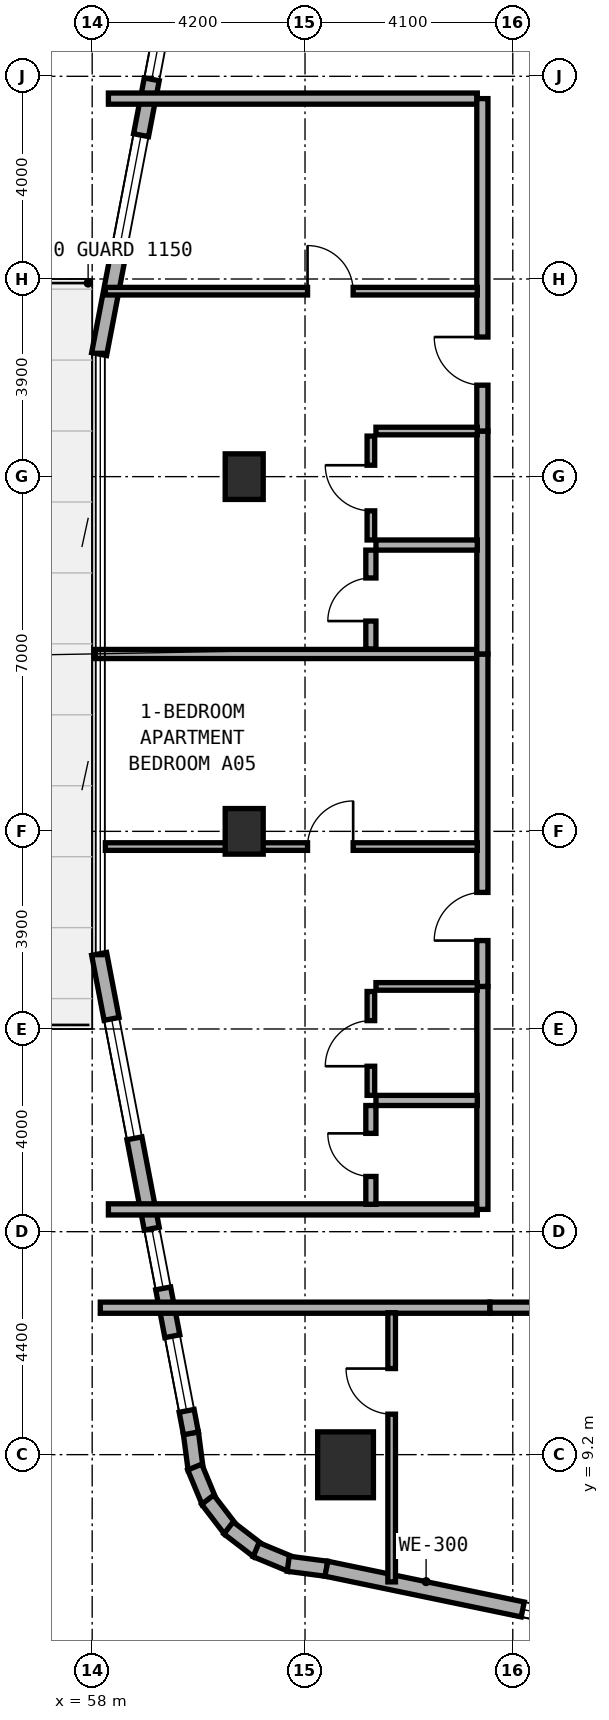
"""IFC4 building model, lengths in metres.
Left out: names, types, materials, properties, quantities, classifications, styles, units other than length and angle.
Written with IfcOpenShell. Run it as: python <this file> out.ifc"""

import sys

from ifc_helpers import new_model, si_unit, direction, frame, frame_2d, origin, origin_2d, place, context, subcontext, project, spatial, rectangle, extrude, element, fill, save


model = new_model("IFC4")
c1 = context("Model", 3, precision=1e-05, world=origin(), true_north=direction((0.0, 1.0)))
c2 = subcontext(c1, "Body", "Model", "MODEL_VIEW")
j1 = project(units=[si_unit("LENGTHUNIT", "METRE"), si_unit("PLANEANGLEUNIT", "RADIAN")], contexts=[c1])
p1 = place(None, origin())
s1 = spatial("IfcSite", under=j1, at=p1, CompositionType="ELEMENT")
p2 = place(p1, origin())
s2 = spatial("IfcBuilding", under=s1, at=p2, CompositionType="ELEMENT")
p3 = place(p2, frame((0.0, 0.0, 24.0)))
s3 = spatial("IfcBuildingStorey", under=s2, at=p3, CompositionType="ELEMENT", Elevation=24.0)
for number, where, z_axis, x_axis in (
    (1, (61.0, 21.5, 0.0), (0.0, 0.0, 1.0), (1.0, 0.0, 0.0)),
    (2, (61.0, 28.5, 0.0), (0.0, 0.0, 1.0), (1.0, 0.0, 0.0)),
):
    element("IfcColumn", number, at=place(p3, frame(where, z_axis=z_axis, x_axis=x_axis)), inside=s3, PredefinedType="COLUMN", context=c2, shape_type="SweptSolid", body=[
        extrude(rectangle(XDim=0.75, YDim=0.9, at=origin_2d()), origin(), (0.0, 0.0, 1.0), 3.5),
    ])
p4 = place(p3, frame((63.0, 9.0, 0.0), z_axis=(0.0, 0.0, 1.0), x_axis=(1.0, 0.0, 0.0)))
e3 = element("IfcColumn", 3, at=p4, inside=s3, PredefinedType="COLUMN", context=c2, shape_type="SweptSolid", body=[
    extrude(rectangle(XDim=1.1, YDim=1.3, at=origin_2d()), origin(), (0.0, 0.0, 1.0), 3.5),
])
p5 = place(p3, frame((59.948, 9.627, 0.0), z_axis=(0.0, 0.0, 1.0), x_axis=(0.130255288807, -0.991480488834, 0.0)))
e4 = element("IfcWall", 4, at=p5, inside=s3, PredefinedType="STANDARD", context=c2, shape_type="SweptSolid", body=[
    extrude(rectangle(XDim=0.729, YDim=0.3, at=frame_2d((0.365, 0.0))), origin(), (0.0, 0.0, 1.0), 3.25),
])
for number, where, z_axis, x_axis in (
    (5, (60.024, 8.955, 0.0), (0.0, 0.0, 1.0), (0.384, -0.924, 0.0)),
    (6, (60.279, 8.311, 0.0), (0.0, 0.0, 1.0), (0.608, -0.794, 0.0)),
    (7, (60.691, 7.754, 0.0), (0.0, 0.0, 1.0), (0.794, -0.608, 0.0)),
    (8, (61.234, 7.324, 0.0), (0.0, 0.0, 1.0), (0.924, -0.383, 0.0)),
):
    element("IfcWall", number, at=place(p3, frame(where, z_axis=z_axis, x_axis=x_axis)), inside=s3, PredefinedType="STANDARD", context=c2, shape_type="SweptSolid", body=[
        extrude(rectangle(XDim=0.746, YDim=0.3, at=frame_2d((0.373, 0.0))), origin(), (0.0, 0.0, 1.0), 3.25),
    ])
p6 = place(p3, frame((61.869, 7.047, 0.0), z_axis=(0.0, 0.0, 1.0), x_axis=(0.991559404866, -0.129653178221, 0.0)))
e9 = element("IfcWall", 9, at=p6, inside=s3, PredefinedType="STANDARD", context=c2, shape_type="SweptSolid", body=[
    extrude(rectangle(XDim=0.764, YDim=0.3, at=frame_2d((0.382, 0.0))), origin(), (0.0, 0.0, 1.0), 3.25),
])
p7 = place(p3, frame((62.622, 6.949, 0.0), z_axis=(0.0, 0.0, 1.0), x_axis=(0.979127260729, -0.203248142175, 0.0)))
e10 = element("IfcWall", 10, at=p7, inside=s3, PredefinedType="STANDARD", context=c2, shape_type="SweptSolid", body=[
    extrude(rectangle(XDim=8.92, YDim=0.3, at=frame_2d((4.46, 0.0))), origin(), (0.0, 0.0, 1.0), 3.25),
])
p8 = place(p7, frame((3.957, 0.0, 0.8)))
e11 = element("IfcOpeningElement", 11, at=p8, cuts=e10, PredefinedType="OPENING", context=c2, shape_type="SweptSolid", body=[
    extrude(rectangle(XDim=2.4, YDim=1.6, at=frame_2d((1.2, 0.8))), frame((0.0, 0.16, 0.0), z_axis=(0.0, -1.0, 0.0), x_axis=(1.0, 0.0, 0.0)), (0.0, 0.0, 1.0), 0.32),
])
p9 = place(p3, frame((59.949, 40.38, 0.0), z_axis=(0.0, 0.0, 1.0), x_axis=(-0.188087874316, -0.982152203854, 0.0)))
e12 = element("IfcWall", 12, at=p9, inside=s3, PredefinedType="STANDARD", context=c2, shape_type="SweptSolid", body=[
    extrude(rectangle(XDim=9.634, YDim=0.3, at=frame_2d((4.817, 0.0))), origin(), (0.0, 0.0, 1.0), 3.25),
])
p10 = place(p9, frame((0.452, 0.0, 0.85)))
e13 = element("IfcOpeningElement", 13, at=p10, cuts=e12, PredefinedType="OPENING", context=c2, shape_type="SweptSolid", body=[
    extrude(rectangle(XDim=1.5, YDim=1.5, at=frame_2d((0.75, 0.75))), frame((0.0, 0.16, 0.0), z_axis=(0.0, -1.0, 0.0), x_axis=(1.0, 0.0, 0.0)), (0.0, 0.0, 1.0), 0.32),
])
p11 = place(p9, frame((2.913, 0.0, 0.85)))
e14 = element("IfcOpeningElement", 14, at=p11, cuts=e12, PredefinedType="OPENING", context=c2, shape_type="SweptSolid", body=[
    extrude(rectangle(XDim=1.2, YDim=1.5, at=frame_2d((0.6, 0.75))), frame((0.0, 0.16, 0.0), z_axis=(0.0, -1.0, 0.0), x_axis=(1.0, 0.0, 0.0)), (0.0, 0.0, 1.0), 0.32),
])
p12 = place(p9, frame((5.235, 0.0, 0.8)))
e15 = element("IfcOpeningElement", 15, at=p12, cuts=e12, PredefinedType="OPENING", context=c2, shape_type="SweptSolid", body=[
    extrude(rectangle(XDim=2.4, YDim=1.6, at=frame_2d((1.2, 0.8))), frame((0.0, 0.16, 0.0), z_axis=(0.0, -1.0, 0.0), x_axis=(1.0, 0.0, 0.0)), (0.0, 0.0, 1.0), 0.32),
])
p13 = place(p3, frame((58.137, 19.082, 0.0), z_axis=(0.0, 0.0, 1.0), x_axis=(0.188087874316, -0.982152203854, 0.0)))
e16 = element("IfcWall", 16, at=p13, inside=s3, PredefinedType="STANDARD", context=c2, shape_type="SweptSolid", body=[
    extrude(rectangle(XDim=9.634, YDim=0.3, at=frame_2d((4.817, 0.0))), origin(), (0.0, 0.0, 1.0), 3.25),
])
p14 = place(p13, frame((1.306, 0.0, 0.8)))
e17 = element("IfcOpeningElement", 17, at=p14, cuts=e16, PredefinedType="OPENING", context=c2, shape_type="SweptSolid", body=[
    extrude(rectangle(XDim=2.4, YDim=1.6, at=frame_2d((1.2, 0.8))), frame((0.0, 0.16, 0.0), z_axis=(0.0, -1.0, 0.0), x_axis=(1.0, 0.0, 0.0)), (0.0, 0.0, 1.0), 0.32),
])
p15 = place(p13, frame((5.521, 0.0, 0.85)))
e18 = element("IfcOpeningElement", 18, at=p15, cuts=e16, PredefinedType="OPENING", context=c2, shape_type="SweptSolid", body=[
    extrude(rectangle(XDim=1.2, YDim=1.5, at=frame_2d((0.6, 0.75))), frame((0.0, 0.16, 0.0), z_axis=(0.0, -1.0, 0.0), x_axis=(1.0, 0.0, 0.0)), (0.0, 0.0, 1.0), 0.32),
])
p16 = place(p13, frame((7.682, 0.0, 0.85)))
e19 = element("IfcOpeningElement", 19, at=p16, cuts=e16, PredefinedType="OPENING", context=c2, shape_type="SweptSolid", body=[
    extrude(rectangle(XDim=1.5, YDim=1.5, at=frame_2d((0.75, 0.75))), frame((0.0, 0.16, 0.0), z_axis=(0.0, -1.0, 0.0), x_axis=(1.0, 0.0, 0.0)), (0.0, 0.0, 1.0), 0.32),
])
p17 = place(p3, frame((58.16, 12.1, 0.0), z_axis=(0.0, 0.0, 1.0), x_axis=(1.0, 0.0, 0.0)))
e20 = element("IfcWall", 20, at=p17, inside=s3, PredefinedType="SOLIDWALL", context=c2, shape_type="SweptSolid", body=[
    extrude(rectangle(XDim=7.69, YDim=0.22, at=frame_2d((3.845, 0.0))), origin(), (0.0, 0.0, 1.0), 2.865),
])
p18 = place(p3, frame((65.85, 12.1, 0.0), z_axis=(0.0, 0.0, 1.0), x_axis=(1.0, 0.0, 0.0)))
e21 = element("IfcWall", 21, at=p18, inside=s3, PredefinedType="SOLIDWALL", context=c2, shape_type="SweptSolid", body=[
    extrude(rectangle(XDim=8.87, YDim=0.22, at=frame_2d((4.435, 0.0))), origin(), (0.0, 0.0, 1.0), 2.725),
])
p19 = place(p18, frame((3.96, 0.0, 0.0)))
e22 = element("IfcOpeningElement", 22, at=p19, cuts=e21, PredefinedType="OPENING", context=c2, shape_type="SweptSolid", body=[
    extrude(rectangle(XDim=0.95, YDim=2.1, at=frame_2d((0.475, 1.05))), frame((0.0, 0.12, 0.0), z_axis=(0.0, -1.0, 0.0), x_axis=(1.0, 0.0, 0.0)), (0.0, 0.0, 1.0), 0.24),
])
p20 = place(p3, frame((63.91, 6.689, 0.0), z_axis=(0.0, 0.0, 1.0), x_axis=(0.0, 1.0, 0.0)))
e23 = element("IfcWall", 23, at=p20, inside=s3, PredefinedType="PARTITIONING", context=c2, shape_type="SweptSolid", body=[
    extrude(rectangle(XDim=5.311, YDim=0.15, at=frame_2d((2.656, 0.0))), origin(), (0.0, 0.0, 1.0), 2.865),
])
p21 = place(p20, frame((3.31, 0.0, 0.0)))
e24 = element("IfcOpeningElement", 24, at=p21, cuts=e23, PredefinedType="OPENING", context=c2, shape_type="SweptSolid", body=[
    extrude(rectangle(XDim=0.9, YDim=2.1, at=frame_2d((0.45, 1.05))), frame((0.0, 0.085, 0.0), z_axis=(0.0, -1.0, 0.0), x_axis=(1.0, 0.0, 0.0)), (0.0, 0.0, 1.0), 0.17),
])
for number, where, z_axis, x_axis in (
    (25, (58.32, 14.04, 0.0), (0.0, 0.0, 1.0), (1.0, 0.0, 0.0)),
    (26, (58.32, 35.96, 0.0), (0.0, 0.0, 1.0), (1.0, 0.0, 0.0)),
):
    element("IfcWall", number, at=place(p3, frame(where, z_axis=z_axis, x_axis=x_axis)), inside=s3, PredefinedType="SOLIDWALL", context=c2, shape_type="SweptSolid", body=[
        extrude(rectangle(XDim=7.28, YDim=0.22, at=frame_2d((3.64, 0.0))), origin(), (0.0, 0.0, 1.0), 2.865),
    ])
p22 = place(p3, frame((58.06, 25.0, 0.0), z_axis=(0.0, 0.0, 1.0), x_axis=(1.0, 0.0, 0.0)))
e27 = element("IfcWall", 27, at=p22, inside=s3, PredefinedType="SOLIDWALL", context=c2, shape_type="SweptSolid", body=[
    extrude(rectangle(XDim=7.64, YDim=0.18, at=frame_2d((3.82, 0.0))), origin(), (0.0, 0.0, 1.0), 2.865),
])
p23 = place(p3, frame((65.7, 14.04, 0.0), z_axis=(0.0, 0.0, 1.0), x_axis=(0.0, 1.0, 0.0)))
e28 = element("IfcWall", 28, at=p23, inside=s3, PredefinedType="SOLIDWALL", context=c2, shape_type="SweptSolid", body=[
    extrude(rectangle(XDim=4.4, YDim=0.22, at=frame_2d((2.2, 0.0))), origin(), (0.0, 0.0, 1.0), 3.22),
])
p24 = place(p3, frame((65.7, 18.44, 0.0), z_axis=(0.0, 0.0, 1.0), x_axis=(0.0, 1.0, 0.0)))
e29 = element("IfcWall", 29, at=p24, inside=s3, PredefinedType="SOLIDWALL", context=c2, shape_type="SweptSolid", body=[
    extrude(rectangle(XDim=6.56, YDim=0.22, at=frame_2d((3.28, 0.0))), origin(), (0.0, 0.0, 1.0), 2.725),
])
p25 = place(p24, frame((0.905, 0.0, 0.0)))
e30 = element("IfcOpeningElement", 30, at=p25, cuts=e29, PredefinedType="OPENING", context=c2, shape_type="SweptSolid", body=[
    extrude(rectangle(XDim=0.95, YDim=2.1, at=frame_2d((0.475, 1.05))), frame((0.0, 0.12, 0.0), z_axis=(0.0, -1.0, 0.0), x_axis=(1.0, 0.0, 0.0)), (0.0, 0.0, 1.0), 0.24),
])
p26 = place(p3, frame((58.26, 21.2, 0.0), z_axis=(0.0, 0.0, 1.0), x_axis=(1.0, 0.0, 0.0)))
e31 = element("IfcWall", 31, at=p26, inside=s3, PredefinedType="PARTITIONING", context=c2, shape_type="SweptSolid", body=[
    extrude(rectangle(XDim=7.34, YDim=0.15, at=frame_2d((3.67, 0.0))), origin(), (0.0, 0.0, 1.0), 2.865),
])
p27 = place(p26, frame((3.99, 0.0, 0.0)))
e32 = element("IfcOpeningElement", 32, at=p27, cuts=e31, PredefinedType="OPENING", context=c2, shape_type="SweptSolid", body=[
    extrude(rectangle(XDim=0.9, YDim=2.1, at=frame_2d((0.45, 1.05))), frame((0.0, 0.085, 0.0), z_axis=(0.0, -1.0, 0.0), x_axis=(1.0, 0.0, 0.0)), (0.0, 0.0, 1.0), 0.17),
])
p28 = place(p3, frame((63.6, 16.19, 0.0), z_axis=(0.0, 0.0, 1.0), x_axis=(1.0, 0.0, 0.0)))
e33 = element("IfcWall", 33, at=p28, inside=s3, PredefinedType="PLUMBINGWALL", context=c2, shape_type="SweptSolid", body=[
    extrude(rectangle(XDim=2.0, YDim=0.2, at=frame_2d((1.0, 0.0))), origin(), (0.0, 0.0, 1.0), 3.22),
])
p29 = place(p3, frame((63.6, 18.44, 0.0), z_axis=(0.0, 0.0, 1.0), x_axis=(1.0, 0.0, 0.0)))
e34 = element("IfcWall", 34, at=p29, inside=s3, PredefinedType="PARTITIONING", context=c2, shape_type="SweptSolid", body=[
    extrude(rectangle(XDim=2.0, YDim=0.15, at=frame_2d((1.0, 0.0))), origin(), (0.0, 0.0, 1.0), 3.22),
])
p30 = place(p3, frame((63.5, 14.14, 0.0), z_axis=(0.0, 0.0, 1.0), x_axis=(0.0, 1.0, 0.0)))
e35 = element("IfcWall", 35, at=p30, inside=s3, PredefinedType="PLUMBINGWALL", context=c2, shape_type="SweptSolid", body=[
    extrude(rectangle(XDim=1.95, YDim=0.2, at=frame_2d((0.975, 0.0))), origin(), (0.0, 0.0, 1.0), 3.22),
])
p31 = place(p30, frame((0.55, 0.0, 0.0)))
e36 = element("IfcOpeningElement", 36, at=p31, cuts=e35, PredefinedType="OPENING", context=c2, shape_type="SweptSolid", body=[
    extrude(rectangle(XDim=0.85, YDim=2.1, at=frame_2d((0.425, 1.05))), frame((0.0, 0.11, 0.0), z_axis=(0.0, -1.0, 0.0), x_axis=(1.0, 0.0, 0.0)), (0.0, 0.0, 1.0), 0.22),
])
p32 = place(p3, frame((63.5, 16.29, 0.0), z_axis=(0.0, 0.0, 1.0), x_axis=(0.0, 1.0, 0.0)))
e37 = element("IfcWall", 37, at=p32, inside=s3, PredefinedType="PARTITIONING", context=c2, shape_type="SweptSolid", body=[
    extrude(rectangle(XDim=2.05, YDim=0.15, at=frame_2d((1.025, 0.0))), origin(), (0.0, 0.0, 1.0), 3.22),
])
p33 = place(p32, frame((0.575, 0.0, 0.0)))
e38 = element("IfcOpeningElement", 38, at=p33, cuts=e37, PredefinedType="OPENING", context=c2, shape_type="SweptSolid", body=[
    extrude(rectangle(XDim=0.9, YDim=2.1, at=frame_2d((0.45, 1.05))), frame((0.0, 0.085, 0.0), z_axis=(0.0, -1.0, 0.0), x_axis=(1.0, 0.0, 0.0)), (0.0, 0.0, 1.0), 0.17),
])
p34 = place(p3, frame((65.7, 25.0, 0.0), z_axis=(0.0, 0.0, 1.0), x_axis=(0.0, 1.0, 0.0)))
e39 = element("IfcWall", 39, at=p34, inside=s3, PredefinedType="SOLIDWALL", context=c2, shape_type="SweptSolid", body=[
    extrude(rectangle(XDim=4.4, YDim=0.22, at=frame_2d((2.2, 0.0))), origin(), (0.0, 0.0, 1.0), 2.725),
])
p35 = place(p3, frame((65.7, 29.4, 0.0), z_axis=(0.0, 0.0, 1.0), x_axis=(0.0, 1.0, 0.0)))
e40 = element("IfcWall", 40, at=p35, inside=s3, PredefinedType="SOLIDWALL", context=c2, shape_type="SweptSolid", body=[
    extrude(rectangle(XDim=6.56, YDim=0.22, at=frame_2d((3.28, 0.0))), origin(), (0.0, 0.0, 1.0), 3.22),
])
p36 = place(p35, frame((0.905, 0.0, 0.0)))
e41 = element("IfcOpeningElement", 41, at=p36, cuts=e40, PredefinedType="OPENING", context=c2, shape_type="SweptSolid", body=[
    extrude(rectangle(XDim=0.95, YDim=2.1, at=frame_2d((0.475, 1.05))), frame((0.0, 0.12, 0.0), z_axis=(0.0, -1.0, 0.0), x_axis=(1.0, 0.0, 0.0)), (0.0, 0.0, 1.0), 0.24),
])
p37 = place(p3, frame((58.26, 32.16, 0.0), z_axis=(0.0, 0.0, 1.0), x_axis=(1.0, 0.0, 0.0)))
e42 = element("IfcWall", 42, at=p37, inside=s3, PredefinedType="PARTITIONING", context=c2, shape_type="SweptSolid", body=[
    extrude(rectangle(XDim=7.34, YDim=0.15, at=frame_2d((3.67, 0.0))), origin(), (0.0, 0.0, 1.0), 2.865),
])
p38 = place(p37, frame((3.99, 0.0, 0.0)))
e43 = element("IfcOpeningElement", 43, at=p38, cuts=e42, PredefinedType="OPENING", context=c2, shape_type="SweptSolid", body=[
    extrude(rectangle(XDim=0.9, YDim=2.1, at=frame_2d((0.45, 1.05))), frame((0.0, 0.085, 0.0), z_axis=(0.0, -1.0, 0.0), x_axis=(1.0, 0.0, 0.0)), (0.0, 0.0, 1.0), 0.17),
])
p39 = place(p3, frame((63.6, 27.15, 0.0), z_axis=(0.0, 0.0, 1.0), x_axis=(1.0, 0.0, 0.0)))
e44 = element("IfcWall", 44, at=p39, inside=s3, PredefinedType="PLUMBINGWALL", context=c2, shape_type="SweptSolid", body=[
    extrude(rectangle(XDim=2.0, YDim=0.2, at=frame_2d((1.0, 0.0))), origin(), (0.0, 0.0, 1.0), 3.22),
])
p40 = place(p3, frame((63.6, 29.4, 0.0), z_axis=(0.0, 0.0, 1.0), x_axis=(1.0, 0.0, 0.0)))
e45 = element("IfcWall", 45, at=p40, inside=s3, PredefinedType="PARTITIONING", context=c2, shape_type="SweptSolid", body=[
    extrude(rectangle(XDim=2.0, YDim=0.15, at=frame_2d((1.0, 0.0))), origin(), (0.0, 0.0, 1.0), 3.22),
])
p41 = place(p3, frame((63.5, 25.1, 0.0), z_axis=(0.0, 0.0, 1.0), x_axis=(0.0, 1.0, 0.0)))
e46 = element("IfcWall", 46, at=p41, inside=s3, PredefinedType="PLUMBINGWALL", context=c2, shape_type="SweptSolid", body=[
    extrude(rectangle(XDim=1.95, YDim=0.2, at=frame_2d((0.975, 0.0))), origin(), (0.0, 0.0, 1.0), 3.22),
])
p42 = place(p41, frame((0.55, 0.0, 0.0)))
e47 = element("IfcOpeningElement", 47, at=p42, cuts=e46, PredefinedType="OPENING", context=c2, shape_type="SweptSolid", body=[
    extrude(rectangle(XDim=0.85, YDim=2.1, at=frame_2d((0.425, 1.05))), frame((0.0, 0.11, 0.0), z_axis=(0.0, -1.0, 0.0), x_axis=(1.0, 0.0, 0.0)), (0.0, 0.0, 1.0), 0.22),
])
p43 = place(p3, frame((63.5, 27.25, 0.0), z_axis=(0.0, 0.0, 1.0), x_axis=(0.0, 1.0, 0.0)))
e48 = element("IfcWall", 48, at=p43, inside=s3, PredefinedType="PARTITIONING", context=c2, shape_type="SweptSolid", body=[
    extrude(rectangle(XDim=2.05, YDim=0.15, at=frame_2d((1.025, 0.0))), origin(), (0.0, 0.0, 1.0), 2.725),
])
p44 = place(p43, frame((0.575, 0.0, 0.0)))
e49 = element("IfcOpeningElement", 49, at=p44, cuts=e48, PredefinedType="OPENING", context=c2, shape_type="SweptSolid", body=[
    extrude(rectangle(XDim=0.9, YDim=2.1, at=frame_2d((0.45, 1.05))), frame((0.0, 0.085, 0.0), z_axis=(0.0, -1.0, 0.0), x_axis=(1.0, 0.0, 0.0)), (0.0, 0.0, 1.0), 0.17),
])
p45 = place(p8, origin())
e50 = element("IfcWindow", 50, at=p45, inside=s3, PartitioningType="SINGLE_PANEL", PredefinedType="WINDOW", context=c2, shape_type="SweptSolid", body=[
    extrude(rectangle(XDim=2.4, YDim=1.6, at=frame_2d((1.2, 0.8))), frame((0.0, 0.03, 0.0), z_axis=(0.0, -1.0, 0.0), x_axis=(1.0, 0.0, 0.0)), (0.0, 0.0, 1.0), 0.06),
])
fill(e11, e50)
p46 = place(p11, origin())
e51 = element("IfcWindow", 51, at=p46, inside=s3, PartitioningType="SINGLE_PANEL", PredefinedType="WINDOW", context=c2, shape_type="SweptSolid", body=[
    extrude(rectangle(XDim=1.2, YDim=1.5, at=frame_2d((0.6, 0.75))), frame((0.0, 0.03, 0.0), z_axis=(0.0, -1.0, 0.0), x_axis=(1.0, 0.0, 0.0)), (0.0, 0.0, 1.0), 0.06),
])
fill(e14, e51)
p47 = place(p12, origin())
e52 = element("IfcWindow", 52, at=p47, inside=s3, PartitioningType="SINGLE_PANEL", PredefinedType="WINDOW", context=c2, shape_type="SweptSolid", body=[
    extrude(rectangle(XDim=2.4, YDim=1.6, at=frame_2d((1.2, 0.8))), frame((0.0, 0.03, 0.0), z_axis=(0.0, -1.0, 0.0), x_axis=(1.0, 0.0, 0.0)), (0.0, 0.0, 1.0), 0.06),
])
fill(e15, e52)
p48 = place(p14, origin())
e53 = element("IfcWindow", 53, at=p48, inside=s3, PartitioningType="SINGLE_PANEL", PredefinedType="WINDOW", context=c2, shape_type="SweptSolid", body=[
    extrude(rectangle(XDim=2.4, YDim=1.6, at=frame_2d((1.2, 0.8))), frame((0.0, 0.03, 0.0), z_axis=(0.0, -1.0, 0.0), x_axis=(1.0, 0.0, 0.0)), (0.0, 0.0, 1.0), 0.06),
])
fill(e17, e53)
p49 = place(p15, origin())
e54 = element("IfcWindow", 54, at=p49, inside=s3, PartitioningType="SINGLE_PANEL", PredefinedType="WINDOW", context=c2, shape_type="SweptSolid", body=[
    extrude(rectangle(XDim=1.2, YDim=1.5, at=frame_2d((0.6, 0.75))), frame((0.0, 0.03, 0.0), z_axis=(0.0, -1.0, 0.0), x_axis=(1.0, 0.0, 0.0)), (0.0, 0.0, 1.0), 0.06),
])
fill(e18, e54)
p50 = place(p16, origin())
e55 = element("IfcWindow", 55, at=p50, inside=s3, PartitioningType="SINGLE_PANEL", PredefinedType="WINDOW", context=c2, shape_type="SweptSolid", body=[
    extrude(rectangle(XDim=1.5, YDim=1.5, at=frame_2d((0.75, 0.75))), frame((0.0, 0.03, 0.0), z_axis=(0.0, -1.0, 0.0), x_axis=(1.0, 0.0, 0.0)), (0.0, 0.0, 1.0), 0.06),
])
fill(e19, e55)
p51 = place(p21, origin())
e56 = element("IfcDoor", 56, at=p51, inside=s3, OperationType="SINGLE_SWING_RIGHT", PredefinedType="DOOR", context=c2, shape_type="SweptSolid", body=[
    extrude(rectangle(XDim=0.9, YDim=2.1, at=frame_2d((0.45, 1.05))), frame((0.0, 0.025, 0.0), z_axis=(0.0, -1.0, 0.0), x_axis=(1.0, 0.0, 0.0)), (0.0, 0.0, 1.0), 0.05),
])
fill(e24, e56)
p52 = place(p25, origin())
e57 = element("IfcDoor", 57, at=p52, inside=s3, OperationType="SINGLE_SWING_LEFT", PredefinedType="DOOR", context=c2, shape_type="SweptSolid", body=[
    extrude(rectangle(XDim=0.95, YDim=2.1, at=frame_2d((0.475, 1.05))), frame((0.0, 0.025, 0.0), z_axis=(0.0, -1.0, 0.0), x_axis=(1.0, 0.0, 0.0)), (0.0, 0.0, 1.0), 0.05),
])
fill(e30, e57)
p53 = place(p27, origin())
e58 = element("IfcDoor", 58, at=p53, inside=s3, OperationType="SINGLE_SWING_RIGHT", PredefinedType="DOOR", context=c2, shape_type="SweptSolid", body=[
    extrude(rectangle(XDim=0.9, YDim=2.1, at=frame_2d((0.45, 1.05))), frame((0.0, 0.025, 0.0), z_axis=(0.0, -1.0, 0.0), x_axis=(1.0, 0.0, 0.0)), (0.0, 0.0, 1.0), 0.05),
])
fill(e32, e58)
p54 = place(p31, origin())
e59 = element("IfcDoor", 59, at=p54, inside=s3, OperationType="SINGLE_SWING_RIGHT", PredefinedType="DOOR", context=c2, shape_type="SweptSolid", body=[
    extrude(rectangle(XDim=0.85, YDim=2.1, at=frame_2d((0.425, 1.05))), frame((0.0, 0.025, 0.0), z_axis=(0.0, -1.0, 0.0), x_axis=(1.0, 0.0, 0.0)), (0.0, 0.0, 1.0), 0.05),
])
fill(e36, e59)
p55 = place(p33, origin())
e60 = element("IfcDoor", 60, at=p55, inside=s3, OperationType="SINGLE_SWING_LEFT", PredefinedType="DOOR", context=c2, shape_type="SweptSolid", body=[
    extrude(rectangle(XDim=0.9, YDim=2.1, at=frame_2d((0.45, 1.05))), frame((0.0, 0.025, 0.0), z_axis=(0.0, -1.0, 0.0), x_axis=(1.0, 0.0, 0.0)), (0.0, 0.0, 1.0), 0.05),
])
fill(e38, e60)
p56 = place(p36, origin())
e61 = element("IfcDoor", 61, at=p56, inside=s3, OperationType="SINGLE_SWING_RIGHT", PredefinedType="DOOR", context=c2, shape_type="SweptSolid", body=[
    extrude(rectangle(XDim=0.95, YDim=2.1, at=frame_2d((0.475, 1.05))), frame((0.0, 0.025, 0.0), z_axis=(0.0, -1.0, 0.0), x_axis=(1.0, 0.0, 0.0)), (0.0, 0.0, 1.0), 0.05),
])
fill(e41, e61)
p57 = place(p38, origin())
e62 = element("IfcDoor", 62, at=p57, inside=s3, OperationType="SINGLE_SWING_LEFT", PredefinedType="DOOR", context=c2, shape_type="SweptSolid", body=[
    extrude(rectangle(XDim=0.9, YDim=2.1, at=frame_2d((0.45, 1.05))), frame((0.0, 0.025, 0.0), z_axis=(0.0, -1.0, 0.0), x_axis=(1.0, 0.0, 0.0)), (0.0, 0.0, 1.0), 0.05),
])
fill(e43, e62)
p58 = place(p42, origin())
e63 = element("IfcDoor", 63, at=p58, inside=s3, OperationType="SINGLE_SWING_LEFT", PredefinedType="DOOR", context=c2, shape_type="SweptSolid", body=[
    extrude(rectangle(XDim=0.85, YDim=2.1, at=frame_2d((0.425, 1.05))), frame((0.0, 0.025, 0.0), z_axis=(0.0, -1.0, 0.0), x_axis=(1.0, 0.0, 0.0)), (0.0, 0.0, 1.0), 0.05),
])
fill(e47, e63)
p59 = place(p44, origin())
e64 = element("IfcDoor", 64, at=p59, inside=s3, OperationType="SINGLE_SWING_RIGHT", PredefinedType="DOOR", context=c2, shape_type="SweptSolid", body=[
    extrude(rectangle(XDim=0.9, YDim=2.1, at=frame_2d((0.45, 1.05))), frame((0.0, 0.025, 0.0), z_axis=(0.0, -1.0, 0.0), x_axis=(1.0, 0.0, 0.0)), (0.0, 0.0, 1.0), 0.05),
])
fill(e49, e64)
save(model, sys.argv[1])
